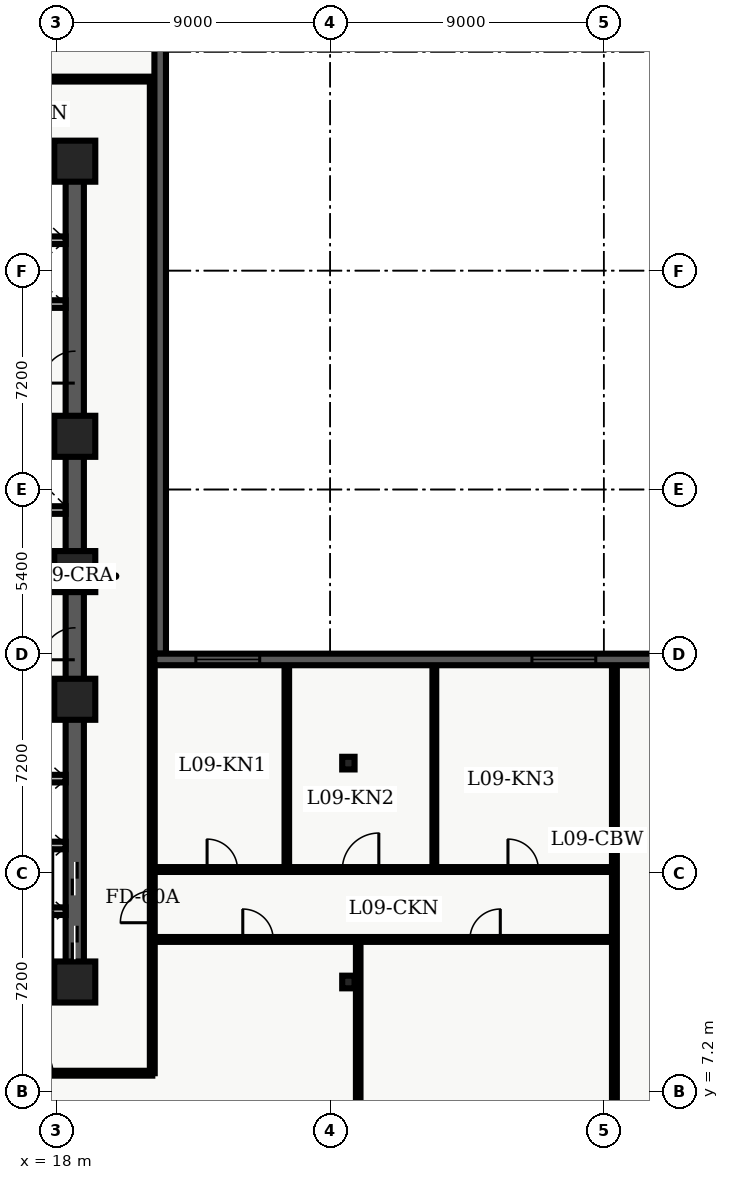
"""IFC4 building model, lengths in metres.
Left out: names, types, materials, properties, quantities, classifications, styles, units other than length and angle.
Written with IfcOpenShell. Run it as: python <this file> out.ifc"""

import sys

from ifc_helpers import new_model, entity, si_unit, converted_unit, direction, frame, origin_with_axes, origin_2d_with_axis, place, context, subcontext, project, spatial, polyline, rectangle, i_section, outline, extrude, element, fill, save


model = new_model("IFC4")
c1 = context("Model", 3, precision=1e-05, world=origin_with_axes(), true_north=direction((0.0, 1.0)))
c2 = subcontext(c1, "Body", "Model", "MODEL_VIEW")
j1 = project(units=[si_unit("LENGTHUNIT", "METRE"), converted_unit("PLANEANGLEUNIT", "DEGREE", entity("IfcPlaneAngleMeasure", 0.017), si_unit("PLANEANGLEUNIT", "RADIAN"), dimensions=[0, 0, 0, 0, 0, 0, 0])], contexts=[c1])
p1 = place(None, origin_with_axes())
s1 = spatial("IfcSite", under=j1, at=p1, CompositionType="ELEMENT")
p2 = place(p1, origin_with_axes())
s2 = spatial("IfcBuilding", under=s1, at=p2, CompositionType="ELEMENT")
p3 = place(p2, frame((0.0, 0.0, 40.5), z_axis=(0.0, 0.0, 1.0), x_axis=(1.0, 0.0, 0.0)))
s3 = spatial("IfcBuildingStorey", under=s2, at=p3, CompositionType="ELEMENT", Elevation=40.5)
p4 = place(p3, frame((11.4, 10.8, 0.0), z_axis=(0.0, 0.0, 1.0), x_axis=(1.0, 0.0, 0.0)))
e1 = element("IfcWall", 1, at=p4, inside=s3, PredefinedType="SHEAR", context=c2, shape_type="SweptSolid", body=[
    extrude(outline(polyline([(0.0, -0.3), (7.2, -0.3), (7.2, 0.3), (0.0, 0.3), (0.0, -0.3)])), origin_with_axes(), (0.0, 0.0, 1.0), 3.66),
])
p5 = place(p4, frame((2.625, 0.0, 0.0), z_axis=(0.0, 0.0, 1.0), x_axis=(1.0, 0.0, 0.0)))
e2 = element("IfcOpeningElement", 2, at=p5, cuts=e1, PredefinedType="OPENING", context=c2, shape_type="SweptSolid", body=[
    extrude(rectangle(XDim=1.05, YDim=0.62, at=origin_2d_with_axis()), origin_with_axes(), (0.0, 0.0, 1.0), 2.15),
])
p6 = place(p3, frame((11.4, 37.8, 0.0), z_axis=(0.0, 0.0, 1.0), x_axis=(1.0, 0.0, 0.0)))
e3 = element("IfcWall", 3, at=p6, inside=s3, PredefinedType="SHEAR", context=c2, shape_type="SweptSolid", body=[
    extrude(outline(polyline([(0.0, -0.3), (7.2, -0.3), (7.2, 0.3), (0.0, 0.3), (0.0, -0.3)])), origin_with_axes(), (0.0, 0.0, 1.0), 3.66),
])
p7 = place(p6, frame((2.625, 0.0, 0.0), z_axis=(0.0, 0.0, 1.0), x_axis=(1.0, 0.0, 0.0)))
e4 = element("IfcOpeningElement", 4, at=p7, cuts=e3, PredefinedType="OPENING", context=c2, shape_type="SweptSolid", body=[
    extrude(rectangle(XDim=1.05, YDim=0.62, at=origin_2d_with_axis()), origin_with_axes(), (0.0, 0.0, 1.0), 2.15),
])
p8 = place(p3, frame((18.6, 10.8, 0.0), z_axis=(0.0, 0.0, 1.0), x_axis=(0.0, 1.0, 0.0)))
e5 = element("IfcWall", 5, at=p8, inside=s3, PredefinedType="SHEAR", context=c2, shape_type="SweptSolid", body=[
    extrude(outline(polyline([(0.0, -0.3), (13.5, -0.3), (13.5, 0.3), (0.0, 0.3), (0.0, -0.3)])), origin_with_axes(), (0.0, 0.0, 1.0), 3.66),
])
p9 = place(p8, frame((1.3, 0.0, 0.0), z_axis=(0.0, 0.0, 1.0), x_axis=(1.0, 0.0, 0.0)))
e6 = element("IfcOpeningElement", 6, at=p9, cuts=e5, PredefinedType="OPENING", context=c2, shape_type="SweptSolid", body=[
    extrude(rectangle(XDim=1.1, YDim=0.62, at=origin_2d_with_axis()), origin_with_axes(), (0.0, 0.0, 1.0), 2.15),
])
p10 = place(p8, frame((3.4, 0.0, 0.0), z_axis=(0.0, 0.0, 1.0), x_axis=(1.0, 0.0, 0.0)))
e7 = element("IfcOpeningElement", 7, at=p10, cuts=e5, PredefinedType="OPENING", context=c2, shape_type="SweptSolid", body=[
    extrude(rectangle(XDim=1.1, YDim=0.62, at=origin_2d_with_axis()), origin_with_axes(), (0.0, 0.0, 1.0), 2.15),
])
p11 = place(p8, frame((11.125, 0.0, 0.0), z_axis=(0.0, 0.0, 1.0), x_axis=(1.0, 0.0, 0.0)))
e8 = element("IfcOpeningElement", 8, at=p11, cuts=e5, PredefinedType="OPENING", context=c2, shape_type="SweptSolid", body=[
    extrude(rectangle(XDim=1.05, YDim=0.62, at=origin_2d_with_axis()), origin_with_axes(), (0.0, 0.0, 1.0), 2.15),
])
p12 = place(p3, frame((18.6, 24.3, 0.0), z_axis=(0.0, 0.0, 1.0), x_axis=(0.0, 1.0, 0.0)))
e9 = element("IfcWall", 9, at=p12, inside=s3, PredefinedType="SHEAR", context=c2, shape_type="SweptSolid", body=[
    extrude(outline(polyline([(0.0, -0.3), (13.5, -0.3), (13.5, 0.3), (0.0, 0.3), (0.0, -0.3)])), origin_with_axes(), (0.0, 0.0, 1.0), 3.66),
])
p13 = place(p12, frame((6.725, 0.0, 0.0), z_axis=(0.0, 0.0, 1.0), x_axis=(1.0, 0.0, 0.0)))
e10 = element("IfcOpeningElement", 10, at=p13, cuts=e9, PredefinedType="OPENING", context=c2, shape_type="SweptSolid", body=[
    extrude(rectangle(XDim=1.05, YDim=0.62, at=origin_2d_with_axis()), origin_with_axes(), (0.0, 0.0, 1.0), 2.15),
])
for number, where, z_axis, x_axis in (
    (11, (11.7, 19.825, 0.0), (0.0, 0.0, 1.0), (1.0, 0.0, 0.0)),
    (12, (11.7, 28.775, 0.0), (0.0, 0.0, 1.0), (1.0, 0.0, 0.0)),
):
    element("IfcWall", number, at=place(p3, frame(where, z_axis=z_axis, x_axis=x_axis)), inside=s3, PredefinedType="SHEAR", context=c2, shape_type="SweptSolid", body=[
        extrude(outline(polyline([(0.0, -0.125), (6.6, -0.125), (6.6, 0.125), (0.0, 0.125), (0.0, -0.125)])), origin_with_axes(), (0.0, 0.0, 1.0), 3.66),
    ])
p14 = place(p3, frame((11.7, 24.1, 0.0), z_axis=(0.0, 0.0, 1.0), x_axis=(1.0, 0.0, 0.0)))
e13 = element("IfcWall", 13, at=p14, inside=s3, PredefinedType="SOLIDWALL", context=c2, shape_type="SweptSolid", body=[
    extrude(outline(polyline([(0.0, -0.125), (6.6, -0.125), (6.6, 0.125), (0.0, 0.125), (0.0, -0.125)])), origin_with_axes(), (0.0, 0.0, 1.0), 2.7),
])
p15 = place(p14, frame((3.75, 0.0, 0.0), z_axis=(0.0, 0.0, 1.0), x_axis=(1.0, 0.0, 0.0)))
e14 = element("IfcOpeningElement", 14, at=p15, cuts=e13, PredefinedType="OPENING", context=c2, shape_type="SweptSolid", body=[
    extrude(rectangle(XDim=0.9, YDim=0.27, at=origin_2d_with_axis()), origin_with_axes(), (0.0, 0.0, 1.0), 2.15),
])
p16 = place(p3, frame((11.7, 26.325, 0.0), z_axis=(0.0, 0.0, 1.0), x_axis=(1.0, 0.0, 0.0)))
e15 = element("IfcWall", 15, at=p16, inside=s3, PredefinedType="SOLIDWALL", context=c2, shape_type="SweptSolid", body=[
    extrude(outline(polyline([(0.0, -0.125), (6.6, -0.125), (6.6, 0.125), (0.0, 0.125), (0.0, -0.125)])), origin_with_axes(), (0.0, 0.0, 1.0), 2.7),
])
p17 = place(p16, frame((3.5, 0.0, 0.0), z_axis=(0.0, 0.0, 1.0), x_axis=(1.0, 0.0, 0.0)))
e16 = element("IfcOpeningElement", 16, at=p17, cuts=e15, PredefinedType="OPENING", context=c2, shape_type="SweptSolid", body=[
    extrude(rectangle(XDim=0.9, YDim=0.27, at=origin_2d_with_axis()), origin_with_axes(), (0.0, 0.0, 1.0), 2.15),
])
for number, where, z_axis, x_axis in (
    (17, (18.6, 10.8, 0.0), (0.0, 0.0, 1.0), (1.0, 0.0, 0.0)),
    (18, (18.6, 20.1, 0.0), (0.0, 0.0, 1.0), (1.0, 0.0, 0.0)),
    (19, (18.6, 24.3, 0.0), (0.0, 0.0, 1.0), (1.0, 0.0, 0.0)),
    (20, (18.6, 28.75, 0.0), (0.0, 0.0, 1.0), (1.0, 0.0, 0.0)),
    (21, (18.6, 37.8, 0.0), (0.0, 0.0, 1.0), (1.0, 0.0, 0.0)),
):
    element("IfcColumn", number, at=place(p3, frame(where, z_axis=z_axis, x_axis=x_axis)), inside=s3, PredefinedType="COLUMN", context=c2, shape_type="SweptSolid", body=[
        extrude(rectangle(XDim=1.35, YDim=1.35, at=origin_2d_with_axis()), origin_with_axes(), (0.0, 0.0, 1.0), 3.9),
    ])
for number, where, z_axis, x_axis in (
    (22, (27.6, 10.8, 0.0), (0.0, 0.0, 1.0), (1.0, 0.0, 0.0)),
    (23, (27.6, 18.0, 0.0), (0.0, 0.0, 1.0), (1.0, 0.0, 0.0)),
):
    element("IfcColumn", number, at=place(p3, frame(where, z_axis=z_axis, x_axis=x_axis)), inside=s3, PredefinedType="COLUMN", context=c2, shape_type="SweptSolid", body=[
        extrude(i_section(OverallWidth=0.406, OverallDepth=0.416, WebThickness=0.03, FlangeThickness=0.048, FilletRadius=0.022, at=origin_2d_with_axis()), origin_with_axes(), (0.0, 0.0, 1.0), 3.9),
    ])
for number, where, z_axis, x_axis in (
    (24, (15.84, 13.13, 0.0), (0.0, 0.0, 1.0), (1.0, 0.0, 0.0)),
    (25, (15.84, 15.29, 0.0), (0.0, 0.0, 1.0), (1.0, 0.0, 0.0)),
    (26, (15.84, 17.49, 0.0), (0.0, 0.0, 1.0), (1.0, 0.0, 0.0)),
    (27, (15.84, 33.1, 0.0), (0.0, 0.0, 1.0), (1.0, 0.0, 0.0)),
    (28, (15.84, 35.2, 0.0), (0.0, 0.0, 1.0), (1.0, 0.0, 0.0)),
):
    element("IfcWall", number, at=place(p3, frame(where, z_axis=z_axis, x_axis=x_axis)), inside=s3, PredefinedType="SOLIDWALL", context=c2, shape_type="SweptSolid", body=[
        extrude(outline(polyline([(0.0, -0.125), (2.46, -0.125), (2.46, 0.125), (0.0, 0.125), (0.0, -0.125)])), origin_with_axes(), (0.0, 0.0, 1.0), 2.7),
    ])
p18 = place(p3, frame((2.6, 7.8, 0.0), z_axis=(0.0, 0.0, 1.0), x_axis=(1.0, 0.0, 0.0)))
e29 = element("IfcWall", 29, at=p18, inside=s3, PredefinedType="PARTITIONING", context=c2, shape_type="SweptSolid", body=[
    extrude(outline(polyline([(0.0, -0.08), (18.55, -0.08), (18.55, 0.08), (0.0, 0.08), (0.0, -0.08)])), origin_with_axes(), (0.0, 0.0, 1.0), 2.7),
])
p19 = place(p18, frame((2.225, 0.0, 0.0), z_axis=(0.0, 0.0, 1.0), x_axis=(1.0, 0.0, 0.0)))
e30 = element("IfcOpeningElement", 30, at=p19, cuts=e29, PredefinedType="OPENING", context=c2, shape_type="SweptSolid", body=[
    extrude(rectangle(XDim=1.0, YDim=0.18, at=origin_2d_with_axis()), origin_with_axes(), (0.0, 0.0, 1.0), 2.15),
])
p20 = place(p18, frame((8.043, 0.0, 0.0), z_axis=(0.0, 0.0, 1.0), x_axis=(1.0, 0.0, 0.0)))
e31 = element("IfcOpeningElement", 31, at=p20, cuts=e29, PredefinedType="OPENING", context=c2, shape_type="SweptSolid", body=[
    extrude(rectangle(XDim=1.0, YDim=0.18, at=origin_2d_with_axis()), origin_with_axes(), (0.0, 0.0, 1.0), 2.15),
])
p21 = place(p18, frame((14.784, 0.0, 0.0), z_axis=(0.0, 0.0, 1.0), x_axis=(1.0, 0.0, 0.0)))
e32 = element("IfcOpeningElement", 32, at=p21, cuts=e29, PredefinedType="OPENING", context=c2, shape_type="SweptSolid", body=[
    extrude(rectangle(XDim=1.0, YDim=0.18, at=origin_2d_with_axis()), origin_with_axes(), (0.0, 0.0, 1.0), 2.15),
])
p22 = place(p3, frame((2.6, 40.5, 0.0), z_axis=(0.0, 0.0, 1.0), x_axis=(1.0, 0.0, 0.0)))
e33 = element("IfcWall", 33, at=p22, inside=s3, PredefinedType="PARTITIONING", context=c2, shape_type="SweptSolid", body=[
    extrude(outline(polyline([(0.0, -0.08), (18.65, -0.08), (18.65, 0.08), (0.0, 0.08), (0.0, -0.08)])), origin_with_axes(), (0.0, 0.0, 1.0), 2.7),
])
p23 = place(p22, frame((5.275, 0.0, 0.0), z_axis=(0.0, 0.0, 1.0), x_axis=(1.0, 0.0, 0.0)))
e34 = element("IfcOpeningElement", 34, at=p23, cuts=e33, PredefinedType="OPENING", context=c2, shape_type="SweptSolid", body=[
    extrude(rectangle(XDim=1.0, YDim=0.18, at=origin_2d_with_axis()), origin_with_axes(), (0.0, 0.0, 1.0), 2.15),
])
p24 = place(p22, frame((12.61, 0.0, 0.0), z_axis=(0.0, 0.0, 1.0), x_axis=(1.0, 0.0, 0.0)))
e35 = element("IfcOpeningElement", 35, at=p24, cuts=e33, PredefinedType="OPENING", context=c2, shape_type="SweptSolid", body=[
    extrude(rectangle(XDim=1.2, YDim=0.18, at=origin_2d_with_axis()), origin_with_axes(), (0.0, 0.0, 1.0), 2.2),
])
p25 = place(p3, frame((21.15, 7.8, 0.0), z_axis=(0.0, 0.0, 1.0), x_axis=(0.0, 1.0, 0.0)))
e36 = element("IfcWall", 36, at=p25, inside=s3, PredefinedType="PARTITIONING", context=c2, shape_type="SweptSolid", body=[
    extrude(outline(polyline([(0.0, -0.08), (32.7, -0.08), (32.7, 0.08), (0.0, 0.08), (0.0, -0.08)])), origin_with_axes(), (0.0, 0.0, 1.0), 2.7),
])
p26 = place(p25, frame((5.475, 0.0, 0.0), z_axis=(0.0, 0.0, 1.0), x_axis=(1.0, 0.0, 0.0)))
e37 = element("IfcOpeningElement", 37, at=p26, cuts=e36, PredefinedType="OPENING", context=c2, shape_type="SweptSolid", body=[
    extrude(rectangle(XDim=1.05, YDim=0.18, at=origin_2d_with_axis()), origin_with_axes(), (0.0, 0.0, 1.0), 2.15),
])
p27 = place(p3, frame((21.15, 12.2, 0.0), z_axis=(0.0, 0.0, 1.0), x_axis=(1.0, 0.0, 0.0)))
e38 = element("IfcWall", 38, at=p27, inside=s3, PredefinedType="PARTITIONING", context=c2, shape_type="SweptSolid", body=[
    extrude(outline(polyline([(0.0, -0.08), (15.2, -0.08), (15.2, 0.08), (0.0, 0.08), (0.0, -0.08)])), origin_with_axes(), (0.0, 0.0, 1.0), 2.7),
])
p28 = place(p27, frame((3.477, 0.0, 0.0), z_axis=(0.0, 0.0, 1.0), x_axis=(1.0, 0.0, 0.0)))
e39 = element("IfcOpeningElement", 39, at=p28, cuts=e38, PredefinedType="OPENING", context=c2, shape_type="SweptSolid", body=[
    extrude(rectangle(XDim=1.0, YDim=0.18, at=origin_2d_with_axis()), origin_with_axes(), (0.0, 0.0, 1.0), 2.15),
])
p29 = place(p27, frame((10.947, 0.0, 0.0), z_axis=(0.0, 0.0, 1.0), x_axis=(1.0, 0.0, 0.0)))
e40 = element("IfcOpeningElement", 40, at=p29, cuts=e38, PredefinedType="OPENING", context=c2, shape_type="SweptSolid", body=[
    extrude(rectangle(XDim=1.0, YDim=0.18, at=origin_2d_with_axis()), origin_with_axes(), (0.0, 0.0, 1.0), 2.15),
])
p30 = place(p3, frame((21.15, 14.5, 0.0), z_axis=(0.0, 0.0, 1.0), x_axis=(1.0, 0.0, 0.0)))
e41 = element("IfcWall", 41, at=p30, inside=s3, PredefinedType="PARTITIONING", context=c2, shape_type="SweptSolid", body=[
    extrude(outline(polyline([(0.0, -0.08), (15.2, -0.08), (15.2, 0.08), (0.0, 0.08), (0.0, -0.08)])), origin_with_axes(), (0.0, 0.0, 1.0), 2.7),
])
p31 = place(p30, frame((2.303, 0.0, 0.0), z_axis=(0.0, 0.0, 1.0), x_axis=(1.0, 0.0, 0.0)))
e42 = element("IfcOpeningElement", 42, at=p31, cuts=e41, PredefinedType="OPENING", context=c2, shape_type="SweptSolid", body=[
    extrude(rectangle(XDim=1.0, YDim=0.18, at=origin_2d_with_axis()), origin_with_axes(), (0.0, 0.0, 1.0), 2.15),
])
p32 = place(p30, frame((6.851, 0.0, 0.0), z_axis=(0.0, 0.0, 1.0), x_axis=(1.0, 0.0, 0.0)))
e43 = element("IfcOpeningElement", 43, at=p32, cuts=e41, PredefinedType="OPENING", context=c2, shape_type="SweptSolid", body=[
    extrude(rectangle(XDim=1.2, YDim=0.18, at=origin_2d_with_axis()), origin_with_axes(), (0.0, 0.0, 1.0), 2.2),
])
p33 = place(p30, frame((12.198, 0.0, 0.0), z_axis=(0.0, 0.0, 1.0), x_axis=(1.0, 0.0, 0.0)))
e44 = element("IfcOpeningElement", 44, at=p33, cuts=e41, PredefinedType="OPENING", context=c2, shape_type="SweptSolid", body=[
    extrude(rectangle(XDim=1.0, YDim=0.18, at=origin_2d_with_axis()), origin_with_axes(), (0.0, 0.0, 1.0), 2.15),
])
p34 = place(p3, frame((36.35, 4.35, 0.0), z_axis=(0.0, 0.0, 1.0), x_axis=(0.0, 1.0, 0.0)))
e45 = element("IfcWall", 45, at=p34, inside=s3, PredefinedType="PARTITIONING", context=c2, shape_type="SweptSolid", body=[
    extrude(outline(polyline([(0.0, -0.08), (16.95, -0.08), (16.95, 0.08), (0.0, 0.08), (0.0, -0.08)])), origin_with_axes(), (0.0, 0.0, 1.0), 2.7),
])
p35 = place(p3, frame((27.923, 0.36, 0.0), z_axis=(0.0, 0.0, 1.0), x_axis=(0.0, 1.0, 0.0)))
e46 = element("IfcWall", 46, at=p35, inside=s3, PredefinedType="PARTITIONING", context=c2, shape_type="SweptSolid", body=[
    extrude(outline(polyline([(0.0, -0.075), (11.72, -0.075), (11.72, 0.075), (0.0, 0.075), (0.0, -0.075)])), origin_with_axes(), (0.0, 0.0, 1.0), 2.7),
])
p36 = place(p3, frame((25.575, 14.62, 0.0), z_axis=(0.0, 0.0, 1.0), x_axis=(0.0, 1.0, 0.0)))
e47 = element("IfcWall", 47, at=p36, inside=s3, PredefinedType="PARTITIONING", context=c2, shape_type="SweptSolid", body=[
    extrude(outline(polyline([(0.0, -0.075), (6.605, -0.075), (6.605, 0.075), (0.0, 0.075), (0.0, -0.075)])), origin_with_axes(), (0.0, 0.0, 1.0), 2.7),
])
p37 = place(p3, frame((30.427, 14.62, 0.0), z_axis=(0.0, 0.0, 1.0), x_axis=(0.0, 1.0, 0.0)))
e48 = element("IfcWall", 48, at=p37, inside=s3, PredefinedType="PARTITIONING", context=c2, shape_type="SweptSolid", body=[
    extrude(outline(polyline([(0.0, -0.062), (6.605, -0.062), (6.605, 0.062), (0.0, 0.062), (0.0, -0.062)])), origin_with_axes(), (0.0, 0.0, 1.0), 2.7),
])
p38 = place(p3, frame((21.41, 45.82, 0.0), z_axis=(0.0, 0.0, 1.0), x_axis=(0.0, -1.0, 0.0)))
e49 = element("IfcWall", 49, at=p38, inside=s3, PredefinedType="SOLIDWALL", context=c2, shape_type="SweptSolid", body=[
    extrude(outline(polyline([(0.0, -0.19), (24.22, -0.19), (24.22, 0.19), (0.0, 0.19), (0.0, -0.19)])), origin_with_axes(), (0.0, 0.0, 1.0), 3.66),
])
p39 = place(p38, frame((2.902, 0.0, 0.45), z_axis=(0.0, 0.0, 1.0), x_axis=(1.0, 0.0, 0.0)))
e50 = element("IfcOpeningElement", 50, at=p39, cuts=e49, PredefinedType="OPENING", context=c2, shape_type="SweptSolid", body=[
    extrude(rectangle(XDim=2.1, YDim=0.4, at=origin_2d_with_axis()), origin_with_axes(), (0.0, 0.0, 1.0), 2.2),
])
p40 = place(p3, frame((21.22, 21.41, 0.0), z_axis=(0.0, 0.0, 1.0), x_axis=(1.0, 0.0, 0.0)))
e51 = element("IfcWall", 51, at=p40, inside=s3, PredefinedType="SOLIDWALL", context=c2, shape_type="SweptSolid", body=[
    extrude(outline(polyline([(0.0, -0.19), (17.18, -0.19), (17.18, 0.19), (0.0, 0.19), (0.0, -0.19)])), origin_with_axes(), (0.0, 0.0, 1.0), 3.66),
])
p41 = place(p40, frame((2.413, 0.0, 0.45), z_axis=(0.0, 0.0, 1.0), x_axis=(1.0, 0.0, 0.0)))
e52 = element("IfcOpeningElement", 52, at=p41, cuts=e51, PredefinedType="OPENING", context=c2, shape_type="SweptSolid", body=[
    extrude(rectangle(XDim=2.1, YDim=0.4, at=origin_2d_with_axis()), origin_with_axes(), (0.0, 0.0, 1.0), 2.2),
])
p42 = place(p40, frame((13.467, 0.0, 0.45), z_axis=(0.0, 0.0, 1.0), x_axis=(1.0, 0.0, 0.0)))
e53 = element("IfcOpeningElement", 53, at=p42, cuts=e51, PredefinedType="OPENING", context=c2, shape_type="SweptSolid", body=[
    extrude(rectangle(XDim=2.1, YDim=0.4, at=origin_2d_with_axis()), origin_with_axes(), (0.0, 0.0, 1.0), 2.2),
])
p43 = place(p8, frame((1.3, 0.0, 0.0), z_axis=(0.0, 0.0, 1.0), x_axis=(1.0, 0.0, 0.0)))
e54 = element("IfcDoor", 54, at=p43, inside=s3, OperationType="SLIDING_TO_LEFT", PredefinedType="DOOR", context=c2, shape_type="SweptSolid", body=[
    extrude(rectangle(XDim=1.1, YDim=0.09, at=origin_2d_with_axis()), origin_with_axes(), (0.0, 0.0, 1.0), 2.15),
])
fill(e6, e54)
p44 = place(p8, frame((3.4, 0.0, 0.0), z_axis=(0.0, 0.0, 1.0), x_axis=(1.0, 0.0, 0.0)))
e55 = element("IfcDoor", 55, at=p44, inside=s3, OperationType="SLIDING_TO_RIGHT", PredefinedType="DOOR", context=c2, shape_type="SweptSolid", body=[
    extrude(rectangle(XDim=1.1, YDim=0.09, at=origin_2d_with_axis()), origin_with_axes(), (0.0, 0.0, 1.0), 2.15),
])
fill(e7, e55)
p45 = place(p8, frame((11.125, 0.0, 0.0), z_axis=(0.0, 0.0, 1.0), x_axis=(1.0, 0.0, 0.0)))
e56 = element("IfcDoor", 56, at=p45, inside=s3, OperationType="SINGLE_SWING_LEFT", PredefinedType="DOOR", context=c2, shape_type="SweptSolid", body=[
    extrude(rectangle(XDim=1.05, YDim=0.09, at=origin_2d_with_axis()), origin_with_axes(), (0.0, 0.0, 1.0), 2.15),
])
fill(e8, e56)
p46 = place(p12, frame((6.725, 0.0, 0.0), z_axis=(0.0, 0.0, 1.0), x_axis=(1.0, 0.0, 0.0)))
e57 = element("IfcDoor", 57, at=p46, inside=s3, OperationType="SINGLE_SWING_LEFT", PredefinedType="DOOR", context=c2, shape_type="SweptSolid", body=[
    extrude(rectangle(XDim=1.05, YDim=0.09, at=origin_2d_with_axis()), origin_with_axes(), (0.0, 0.0, 1.0), 2.15),
])
fill(e10, e57)
p47 = place(p18, frame((14.784, 0.0, 0.0), z_axis=(0.0, 0.0, 1.0), x_axis=(1.0, 0.0, 0.0)))
e58 = element("IfcDoor", 58, at=p47, inside=s3, OperationType="SINGLE_SWING_LEFT", PredefinedType="DOOR", context=c2, shape_type="SweptSolid", body=[
    extrude(rectangle(XDim=1.0, YDim=0.09, at=origin_2d_with_axis()), origin_with_axes(), (0.0, 0.0, 1.0), 2.15),
])
fill(e32, e58)
p48 = place(p25, frame((5.475, 0.0, 0.0), z_axis=(0.0, 0.0, 1.0), x_axis=(1.0, 0.0, 0.0)))
e59 = element("IfcDoor", 59, at=p48, inside=s3, OperationType="SINGLE_SWING_LEFT", PredefinedType="DOOR", context=c2, shape_type="SweptSolid", body=[
    extrude(rectangle(XDim=1.05, YDim=0.09, at=origin_2d_with_axis()), origin_with_axes(), (0.0, 0.0, 1.0), 2.15),
])
fill(e37, e59)
p49 = place(p27, frame((3.477, 0.0, 0.0), z_axis=(0.0, 0.0, 1.0), x_axis=(1.0, 0.0, 0.0)))
e60 = element("IfcDoor", 60, at=p49, inside=s3, OperationType="SINGLE_SWING_LEFT", PredefinedType="DOOR", context=c2, shape_type="SweptSolid", body=[
    extrude(rectangle(XDim=1.0, YDim=0.09, at=origin_2d_with_axis()), origin_with_axes(), (0.0, 0.0, 1.0), 2.15),
])
fill(e39, e60)
p50 = place(p27, frame((10.947, 0.0, 0.0), z_axis=(0.0, 0.0, 1.0), x_axis=(1.0, 0.0, 0.0)))
e61 = element("IfcDoor", 61, at=p50, inside=s3, OperationType="SINGLE_SWING_RIGHT", PredefinedType="DOOR", context=c2, shape_type="SweptSolid", body=[
    extrude(rectangle(XDim=1.0, YDim=0.09, at=origin_2d_with_axis()), origin_with_axes(), (0.0, 0.0, 1.0), 2.15),
])
fill(e40, e61)
p51 = place(p30, frame((2.303, 0.0, 0.0), z_axis=(0.0, 0.0, 1.0), x_axis=(1.0, 0.0, 0.0)))
e62 = element("IfcDoor", 62, at=p51, inside=s3, OperationType="SINGLE_SWING_LEFT", PredefinedType="DOOR", context=c2, shape_type="SweptSolid", body=[
    extrude(rectangle(XDim=1.0, YDim=0.09, at=origin_2d_with_axis()), origin_with_axes(), (0.0, 0.0, 1.0), 2.15),
])
fill(e42, e62)
p52 = place(p30, frame((6.851, 0.0, 0.0), z_axis=(0.0, 0.0, 1.0), x_axis=(1.0, 0.0, 0.0)))
e63 = element("IfcDoor", 63, at=p52, inside=s3, OperationType="SINGLE_SWING_RIGHT", PredefinedType="DOOR", context=c2, shape_type="SweptSolid", body=[
    extrude(rectangle(XDim=1.2, YDim=0.09, at=origin_2d_with_axis()), origin_with_axes(), (0.0, 0.0, 1.0), 2.2),
])
fill(e43, e63)
p53 = place(p30, frame((12.198, 0.0, 0.0), z_axis=(0.0, 0.0, 1.0), x_axis=(1.0, 0.0, 0.0)))
e64 = element("IfcDoor", 64, at=p53, inside=s3, OperationType="SINGLE_SWING_LEFT", PredefinedType="DOOR", context=c2, shape_type="SweptSolid", body=[
    extrude(rectangle(XDim=1.0, YDim=0.09, at=origin_2d_with_axis()), origin_with_axes(), (0.0, 0.0, 1.0), 2.15),
])
fill(e44, e64)
p54 = place(p40, frame((2.413, 0.0, 0.45), z_axis=(0.0, 0.0, 1.0), x_axis=(1.0, 0.0, 0.0)))
e65 = element("IfcWindow", 65, at=p54, inside=s3, PredefinedType="WINDOW", context=c2, shape_type="SweptSolid", body=[
    extrude(rectangle(XDim=2.1, YDim=0.09, at=origin_2d_with_axis()), origin_with_axes(), (0.0, 0.0, 1.0), 2.2),
])
fill(e52, e65)
p55 = place(p40, frame((13.467, 0.0, 0.45), z_axis=(0.0, 0.0, 1.0), x_axis=(1.0, 0.0, 0.0)))
e66 = element("IfcWindow", 66, at=p55, inside=s3, PredefinedType="WINDOW", context=c2, shape_type="SweptSolid", body=[
    extrude(rectangle(XDim=2.1, YDim=0.09, at=origin_2d_with_axis()), origin_with_axes(), (0.0, 0.0, 1.0), 2.2),
])
fill(e53, e66)
save(model, sys.argv[1])
